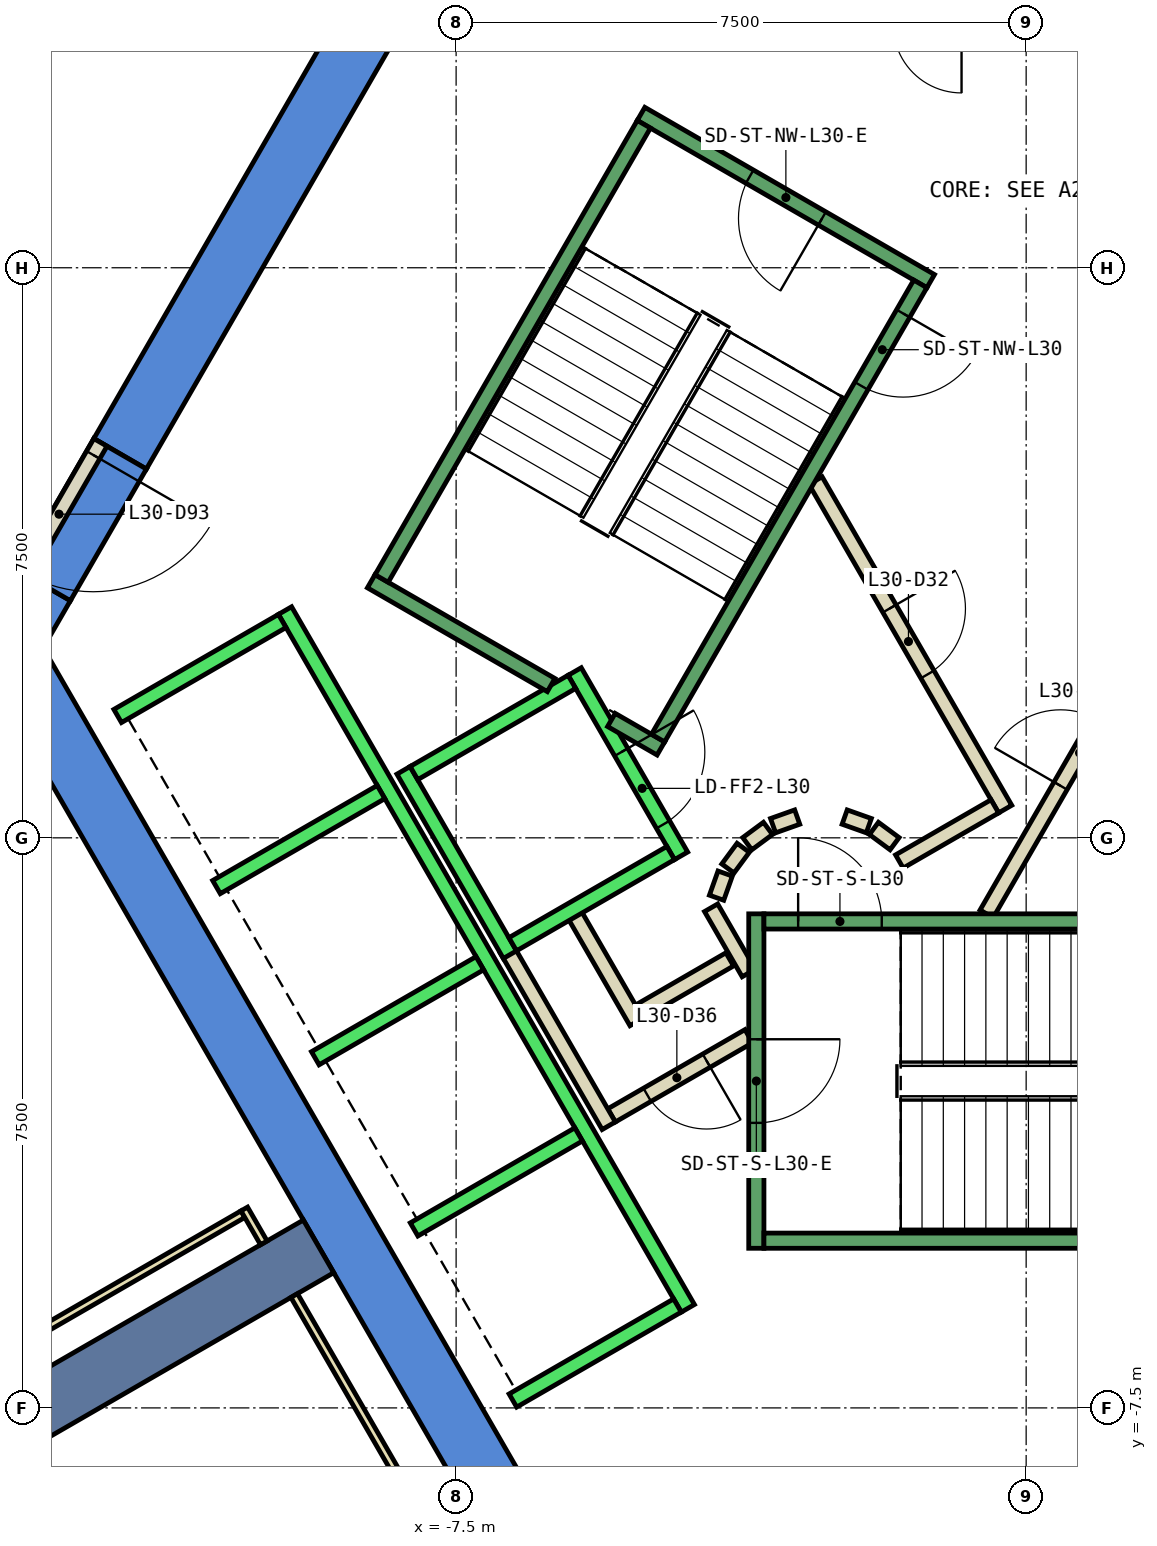
"""IFC4 building model, lengths in metres.
Left out: names, types, materials, properties, quantities, classifications, styles, units other than length and angle.
Written with IfcOpenShell. Run it as: python <this file> out.ifc"""

import sys

from ifc_helpers import new_model, si_unit, direction, frame, frame_2d, origin, place, context, subcontext, project, spatial, polyline, rectangle, outline, extrude, element, fill, save


model = new_model("IFC4")
c1 = context("Model", 3, precision=1e-05, world=origin(), true_north=direction((0.0, 1.0)))
c2 = subcontext(c1, "Body", "Model", "MODEL_VIEW")
j1 = project(units=[si_unit("LENGTHUNIT", "METRE"), si_unit("PLANEANGLEUNIT", "RADIAN")], contexts=[c1])
p1 = place(None, origin())
s1 = spatial("IfcSite", under=j1, at=p1, CompositionType="ELEMENT")
p2 = place(p1, origin())
s2 = spatial("IfcBuilding", under=s1, at=p2, CompositionType="ELEMENT")
p3 = place(p2, frame((0.0, 0.0, 138.2)))
s3 = spatial("IfcBuildingStorey", under=s2, at=p3, CompositionType="ELEMENT", Elevation=138.2)
p4 = place(p3, frame((0.0, 0.0, -0.6)))
e1 = element("IfcWall", 1, at=p4, inside=s3, PredefinedType="SHEAR", context=c2, shape_type="SweptSolid", body=[
    extrude(outline(polyline([(-12.267, 5.252), (-11.575, 4.852), (-6.466, 13.7), (-6.928, 14.5), (-12.267, 5.252)])), origin(), (0.0, 0.0, 1.0), 4.4),
])
p5 = place(p3, frame((0.0, 0.0, -0.6)))
e2 = element("IfcWall", 2, at=p5, inside=s3, PredefinedType="SHEAR", context=c2, shape_type="SweptSolid", body=[
    extrude(outline(polyline([(-12.575, 3.12), (-13.267, 3.52), (-13.856, 2.5), (-12.933, 2.5), (-12.575, 3.12)])), origin(), (0.0, 0.0, 1.0), 4.4),
])
p6 = place(p3, frame((0.0, 0.0, 3.6)))
e3 = element("IfcWall", 3, at=p6, inside=s3, PredefinedType="SHEAR", context=c2, shape_type="SweptSolid", body=[
    extrude(outline(polyline([(-13.267, 3.52), (-12.575, 3.12), (-11.575, 4.852), (-12.267, 5.252), (-13.267, 3.52)])), origin(), (0.0, 0.0, 1.0), 0.2),
])
p7 = place(p3, frame((0.0, 0.0, -0.6)))
e4 = element("IfcWall", 4, at=p7, inside=s3, PredefinedType="SHEAR", context=c2, shape_type="SweptSolid", body=[
    extrude(outline(polyline([(-13.856, 2.5), (-6.928, -9.5), (-6.466, -8.7), (-12.933, 2.5), (-13.856, 2.5)])), origin(), (0.0, 0.0, 1.0), 4.4),
])
p8 = place(p3, frame((-9.31, -5.375, -0.6), z_axis=(0.0, 0.0, 1.0), x_axis=(-0.866017533419, -0.500013631625, 0.0)))
e5 = element("IfcWall", 5, at=p8, inside=s3, PredefinedType="SHEAR", context=c2, shape_type="SweptSolid", body=[
    extrude(rectangle(XDim=9.0, YDim=0.8, at=frame_2d((4.5, 0.0))), origin(), (0.0, 0.0, 1.0), 4.4),
])
p9 = place(p3, frame((-3.9, -1.599, 0.0), z_axis=(0.0, 0.0, 1.0), x_axis=(-0.865969445389, -0.500096910261, 0.0)))
e6 = element("IfcWall", 6, at=p9, inside=s3, PredefinedType="PARTITIONING", context=c2, shape_type="SweptSolid", body=[
    extrude(rectangle(XDim=1.373, YDim=0.2, at=frame_2d((0.687, 0.0))), origin(), (0.0, 0.0, 1.0), 3.8),
])
p10 = place(p3, frame((-5.126, -2.422, 0.0), z_axis=(0.0, 0.0, 1.0), x_axis=(-0.500062241894, 0.865989465428, 0.0)))
e7 = element("IfcWall", 7, at=p10, inside=s3, PredefinedType="PARTITIONING", context=c2, shape_type="SweptSolid", body=[
    extrude(rectangle(XDim=1.7, YDim=0.2, at=frame_2d((0.85, 0.0))), origin(), (0.0, 0.0, 1.0), 3.8),
])
p11 = place(p3, frame((-3.65, -2.61, 0.0), z_axis=(0.0, 0.0, 1.0), x_axis=(-0.866072462134, -0.499918483688, 0.0)))
e8 = element("IfcWall", 8, at=p11, inside=s3, PredefinedType="PARTITIONING", context=c2, shape_type="SweptSolid", body=[
    extrude(rectangle(XDim=2.084, YDim=0.2, at=frame_2d((1.042, 0.0))), origin(), (0.0, 0.0, 1.0), 3.8),
])
p12 = place(p11, frame((0.642, 0.0, 0.0)))
e9 = element("IfcOpeningElement", 9, at=p12, cuts=e8, PredefinedType="OPENING", context=c2, shape_type="SweptSolid", body=[
    extrude(rectangle(XDim=0.9, YDim=2.1, at=frame_2d((0.45, 1.05))), frame((0.0, 0.11, 0.0), z_axis=(0.0, -1.0, 0.0), x_axis=(1.0, 0.0, 0.0)), (0.0, 0.0, 1.0), 0.22),
])
p13 = place(p3, frame((-5.492, -3.788, 0.0), z_axis=(0.0, 0.0, 1.0), x_axis=(-0.500008949224, 0.866020236886, 0.0)))
e10 = element("IfcWall", 10, at=p13, inside=s3, PredefinedType="PARTITIONING", context=c2, shape_type="SweptSolid", body=[
    extrude(rectangle(XDim=2.68, YDim=0.2, at=frame_2d((1.34, 0.0))), origin(), (0.0, 0.0, 1.0), 3.8),
])
p14 = place(p3, frame((-4.145, -0.92, 0.0), z_axis=(0.0, 0.0, 1.0), x_axis=(0.499743786207, -0.866173278362, 0.0)))
e11 = element("IfcWall", 11, at=p14, inside=s3, PredefinedType="PARTITIONING", context=c2, shape_type="SweptSolid", body=[
    extrude(rectangle(XDim=0.991, YDim=0.2, at=frame_2d((0.495, 0.0))), origin(), (0.0, 0.0, 1.0), 3.8),
])
p15 = place(p3, frame((-0.52, -1.0, 0.0), z_axis=(0.0, 0.0, 1.0), x_axis=(0.50011622646, 0.865958290007, 0.0)))
e12 = element("IfcWall", 12, at=p15, inside=s3, PredefinedType="PARTITIONING", context=c2, shape_type="SweptSolid", body=[
    extrude(rectangle(XDim=4.991, YDim=0.2, at=frame_2d((2.496, 0.0))), origin(), (0.0, 0.0, 1.0), 3.8),
])
p16 = place(p15, frame((1.945, 0.0, 0.0)))
e13 = element("IfcOpeningElement", 13, at=p16, cuts=e12, PredefinedType="OPENING", context=c2, shape_type="SweptSolid", body=[
    extrude(rectangle(XDim=1.0, YDim=2.1, at=frame_2d((0.5, 1.05))), frame((0.0, 0.11, 0.0), z_axis=(0.0, -1.0, 0.0), x_axis=(1.0, 0.0, 0.0)), (0.0, 0.0, 1.0), 0.22),
])
p17 = place(p3, frame((-2.771, 4.7, 0.0), z_axis=(0.0, 0.0, 1.0), x_axis=(0.499969479948, -0.866043023828, 0.0)))
e14 = element("IfcWall", 14, at=p17, inside=s3, PredefinedType="PARTITIONING", context=c2, shape_type="SweptSolid", body=[
    extrude(rectangle(XDim=4.99, YDim=0.2, at=frame_2d((2.495, 0.0))), origin(), (0.0, 0.0, 1.0), 3.8),
])
p18 = place(p17, frame((1.945, 0.0, 0.0)))
e15 = element("IfcOpeningElement", 15, at=p18, cuts=e14, PredefinedType="OPENING", context=c2, shape_type="SweptSolid", body=[
    extrude(rectangle(XDim=1.0, YDim=2.1, at=frame_2d((0.5, 1.05))), frame((0.0, 0.11, 0.0), z_axis=(0.0, -1.0, 0.0), x_axis=(1.0, 0.0, 0.0)), (0.0, 0.0, 1.0), 0.22),
])
p19 = place(p3, frame((-0.412, 0.414, 0.0), z_axis=(0.0, 0.0, 1.0), x_axis=(-0.866017369001, -0.500013916395, 0.0)))
e16 = element("IfcWall", 16, at=p19, inside=s3, PredefinedType="PARTITIONING", context=c2, shape_type="SweptSolid", body=[
    extrude(rectangle(XDim=1.45, YDim=0.2, at=frame_2d((0.725, 0.0))), origin(), (0.0, 0.0, 1.0), 3.8),
])
p20 = place(p3, frame((-1.731, -0.077, 0.0), z_axis=(0.0, 0.0, 1.0), x_axis=(-0.804311165252, 0.594208338422, 0.0)))
e17 = element("IfcWall", 17, at=p20, inside=s3, PredefinedType="PARTITIONING", context=c2, shape_type="SweptSolid", body=[
    extrude(rectangle(XDim=0.338, YDim=0.2, at=frame_2d((0.169, 0.0))), origin(), (0.0, 0.0, 1.0), 3.8),
])
p21 = place(p3, frame((-2.07, 0.16, 0.0), z_axis=(0.0, 0.0, 1.0), x_axis=(-0.942199461132, 0.335052496547, 0.0)))
e18 = element("IfcWall", 18, at=p21, inside=s3, PredefinedType="PARTITIONING", context=c2, shape_type="SweptSolid", body=[
    extrude(rectangle(XDim=0.337, YDim=0.2, at=frame_2d((0.169, 0.0))), origin(), (0.0, 0.0, 1.0), 3.8),
])
p22 = place(p3, frame((-3.012, 0.273, 0.0), z_axis=(0.0, 0.0, 1.0), x_axis=(-0.942280615813, -0.334824194261, 0.0)))
e19 = element("IfcWall", 19, at=p22, inside=s3, PredefinedType="PARTITIONING", context=c2, shape_type="SweptSolid", body=[
    extrude(rectangle(XDim=0.338, YDim=0.2, at=frame_2d((0.169, 0.0))), origin(), (0.0, 0.0, 1.0), 3.8),
])
p23 = place(p3, frame((-3.397, 0.124, 0.0), z_axis=(0.0, 0.0, 1.0), x_axis=(-0.804311165252, -0.594208338422, 0.0)))
e20 = element("IfcWall", 20, at=p23, inside=s3, PredefinedType="PARTITIONING", context=c2, shape_type="SweptSolid", body=[
    extrude(rectangle(XDim=0.338, YDim=0.2, at=frame_2d((0.169, 0.0))), origin(), (0.0, 0.0, 1.0), 3.8),
])
p24 = place(p3, frame((-3.723, -0.131, 0.0), z_axis=(0.0, 0.0, 1.0), x_axis=(-0.594675113454, -0.803966112121, 0.0)))
e21 = element("IfcWall", 21, at=p24, inside=s3, PredefinedType="PARTITIONING", context=c2, shape_type="SweptSolid", body=[
    extrude(rectangle(XDim=0.338, YDim=0.2, at=frame_2d((0.169, 0.0))), origin(), (0.0, 0.0, 1.0), 3.8),
])
p25 = place(p3, frame((-3.96, -0.47, 0.0), z_axis=(0.0, 0.0, 1.0), x_axis=(-0.334824194261, -0.942280615813, 0.0)))
e22 = element("IfcWall", 22, at=p25, inside=s3, PredefinedType="PARTITIONING", context=c2, shape_type="SweptSolid", body=[
    extrude(rectangle(XDim=0.338, YDim=0.2, at=frame_2d((0.169, 0.0))), origin(), (0.0, 0.0, 1.0), 3.8),
])
p26 = place(p3, frame((-7.572, -9.586, 0.0), z_axis=(0.0, 0.0, 1.0), x_axis=(-0.500037407586, 0.866003805427, 0.0)))
e23 = element("IfcWall", 23, at=p26, inside=s3, PredefinedType="PARTITIONING", context=c2, shape_type="SweptSolid", body=[
    extrude(rectangle(XDim=4.115, YDim=0.1, at=frame_2d((2.058, 0.0))), origin(), (0.0, 0.0, 1.0), 3.8),
])
p27 = place(p3, frame((-10.305, -4.951, 0.0), z_axis=(0.0, 0.0, 1.0), x_axis=(-0.866031185235, -0.4999899861, 0.0)))
e24 = element("IfcWall", 24, at=p27, inside=s3, PredefinedType="PARTITIONING", context=c2, shape_type="SweptSolid", body=[
    extrude(rectangle(XDim=4.95, YDim=0.1, at=frame_2d((2.475, 0.0))), origin(), (0.0, 0.0, 1.0), 3.8),
])
p28 = place(p3, frame((-12.18, 5.202, 0.0), z_axis=(0.0, 0.0, 1.0), x_axis=(-0.50002537861, -0.866010750942, 0.0)))
e25 = element("IfcWall", 25, at=p28, inside=s3, PredefinedType="PARTITIONING", context=c2, shape_type="SweptSolid", body=[
    extrude(rectangle(XDim=2.0, YDim=0.2, at=frame_2d((1.0, 0.0))), origin(), (0.0, 0.0, 1.0), 2.4),
])
p29 = place(p28, frame((0.19, 0.0, 0.0)))
e26 = element("IfcOpeningElement", 26, at=p29, cuts=e25, PredefinedType="OPENING", context=c2, shape_type="SweptSolid", body=[
    extrude(rectangle(XDim=1.8, YDim=2.1, at=frame_2d((0.9, 1.05))), frame((0.0, 0.11, 0.0), z_axis=(0.0, -1.0, 0.0), x_axis=(1.0, 0.0, 0.0)), (0.0, 0.0, 1.0), 0.22),
])
p30 = place(p3, frame((-10.03, -5.329, 0.0), z_axis=(0.0, 0.0, 1.0), x_axis=(-0.499352927503, 0.866398669086, 0.0)))
e27 = element("IfcWall", 27, at=p30, inside=s3, PredefinedType="PARTITIONING", context=c2, shape_type="SweptSolid", body=[
    extrude(rectangle(XDim=0.515, YDim=0.1, at=frame_2d((0.257, 0.0))), origin(), (0.0, 0.0, 1.0), 3.8),
])
p31 = place(p3, frame((-5.94, 2.188, 0.0), z_axis=(0.0, 0.0, 1.0), x_axis=(0.49994636267, -0.866056369097, 0.0)))
e28 = element("IfcWall", 28, at=p31, inside=s3, PredefinedType="STANDARD", context=c2, shape_type="SweptSolid", body=[
    extrude(rectangle(XDim=2.8, YDim=0.2, at=frame_2d((1.4, 0.0))), origin(), (0.0, 0.0, 1.0), 3.8),
])
p32 = place(p31, frame((1.225, 0.0, 0.0)))
e29 = element("IfcOpeningElement", 29, at=p32, cuts=e28, PredefinedType="OPENING", context=c2, shape_type="SweptSolid", body=[
    extrude(rectangle(XDim=1.1, YDim=2.1, at=frame_2d((0.55, 1.05))), frame((0.0, 0.11, 0.0), z_axis=(0.0, -1.0, 0.0), x_axis=(1.0, 0.0, 0.0)), (0.0, 0.0, 1.0), 0.22),
])
p33 = place(p3, frame((-8.192, 0.888, 0.0), z_axis=(0.0, 0.0, 1.0), x_axis=(0.49994636267, -0.866056369097, 0.0)))
e30 = element("IfcWall", 30, at=p33, inside=s3, PredefinedType="STANDARD", context=c2, shape_type="SweptSolid", body=[
    extrude(rectangle(XDim=2.8, YDim=0.2, at=frame_2d((1.4, 0.0))), origin(), (0.0, 0.0, 1.0), 3.8),
])
for number, where, z_axis, x_axis in (
    (31, (-5.977, 2.052, 0.0), (0.0, 0.0, 1.0), (-0.866, -0.5, 0.0)),
    (32, (-4.677, -0.2, 0.0), (0.0, 0.0, 1.0), (-0.866, -0.5, 0.0)),
):
    element("IfcWall", number, at=place(p3, frame(where, z_axis=z_axis, x_axis=x_axis)), inside=s3, PredefinedType="STANDARD", context=c2, shape_type="SweptSolid", body=[
        extrude(rectangle(XDim=2.399, YDim=0.2, at=frame_2d((1.2, 0.0))), origin(), (0.0, 0.0, 1.0), 3.8),
    ])
p34 = place(p3, frame((-9.751, 2.99, 0.0), z_axis=(0.0, 0.0, 1.0), x_axis=(0.50000090737, -0.866024879913, 0.0)))
e33 = element("IfcWall", 33, at=p34, inside=s3, PredefinedType="STANDARD", context=c2, shape_type="SweptSolid", body=[
    extrude(rectangle(XDim=10.6, YDim=0.2, at=frame_2d((5.3, 0.0))), origin(), (0.0, 0.0, 1.0), 3.8),
])
p35 = place(p3, frame((-9.788, 2.853, 0.0), z_axis=(0.0, 0.0, 1.0), x_axis=(-0.865998541277, -0.500046524342, 0.0)))
e34 = element("IfcWall", 34, at=p35, inside=s3, PredefinedType="STANDARD", context=c2, shape_type="SweptSolid", body=[
    extrude(rectangle(XDim=2.5, YDim=0.2, at=frame_2d((1.25, 0.0))), origin(), (0.0, 0.0, 1.0), 3.8),
])
for number, where, z_axis, x_axis in (
    (35, (-8.488, 0.602, 0.0), (0.0, 0.0, 1.0), (-0.866, -0.5, 0.0)),
    (36, (-7.188, -1.65, 0.0), (0.0, 0.0, 1.0), (-0.866, -0.5, 0.0)),
    (37, (-5.888, -3.902, 0.0), (0.0, 0.0, 1.0), (-0.866, -0.5, 0.0)),
    (38, (-4.588, -6.153, 0.0), (0.0, 0.0, 1.0), (-0.866, -0.5, 0.0)),
):
    element("IfcWall", number, at=place(p3, frame(where, z_axis=z_axis, x_axis=x_axis)), inside=s3, PredefinedType="STANDARD", context=c2, shape_type="SweptSolid", body=[
        extrude(rectangle(XDim=2.5, YDim=0.2, at=frame_2d((1.25, 0.0))), origin(), (0.0, 0.0, 1.0), 3.8),
    ])
p36 = place(p3, frame((-3.55, -1.0, 0.0), z_axis=(0.0, 0.0, 1.0), x_axis=(0.0, -1.0, 0.0)))
e39 = element("IfcWall", 39, at=p36, inside=s3, PredefinedType="STANDARD", context=c2, shape_type="SweptSolid", body=[
    extrude(rectangle(XDim=4.4, YDim=0.2, at=frame_2d((2.2, 0.0))), origin(), (0.0, 0.0, 1.0), 3.8),
])
p37 = place(p36, frame((1.65, 0.0, 0.0)))
e40 = element("IfcOpeningElement", 40, at=p37, cuts=e39, PredefinedType="OPENING", context=c2, shape_type="SweptSolid", body=[
    extrude(rectangle(XDim=1.1, YDim=2.2, at=frame_2d((0.55, 1.1))), frame((0.0, 0.11, 0.0), z_axis=(0.0, -1.0, 0.0), x_axis=(1.0, 0.0, 0.0)), (0.0, 0.0, 1.0), 0.22),
])
p38 = place(p3, frame((-3.45, -1.1, 0.0), z_axis=(0.0, 0.0, 1.0), x_axis=(1.0, 0.0, 0.0)))
e41 = element("IfcWall", 41, at=p38, inside=s3, PredefinedType="STANDARD", context=c2, shape_type="SweptSolid", body=[
    extrude(rectangle(XDim=6.9, YDim=0.2, at=frame_2d((3.45, 0.0))), origin(), (0.0, 0.0, 1.0), 3.8),
])
p39 = place(p38, frame((0.45, 0.0, 0.0)))
e42 = element("IfcOpeningElement", 42, at=p39, cuts=e41, PredefinedType="OPENING", context=c2, shape_type="SweptSolid", body=[
    extrude(rectangle(XDim=1.1, YDim=2.2, at=frame_2d((0.55, 1.1))), frame((0.0, 0.11, 0.0), z_axis=(0.0, -1.0, 0.0), x_axis=(1.0, 0.0, 0.0)), (0.0, 0.0, 1.0), 0.22),
])
p40 = place(p3, frame((-3.45, -5.3, 0.0), z_axis=(0.0, 0.0, 1.0), x_axis=(1.0, 0.0, 0.0)))
e43 = element("IfcWall", 43, at=p40, inside=s3, PredefinedType="STANDARD", context=c2, shape_type="SweptSolid", body=[
    extrude(rectangle(XDim=6.9, YDim=0.2, at=frame_2d((3.45, 0.0))), origin(), (0.0, 0.0, 1.0), 3.8),
])
p41 = place(p3, frame((-1.256, 7.324, 0.0), z_axis=(0.0, 0.0, 1.0), x_axis=(-0.866046073146, 0.499964197906, 0.0)))
e44 = element("IfcWall", 44, at=p41, inside=s3, PredefinedType="STANDARD", context=c2, shape_type="SweptSolid", body=[
    extrude(rectangle(XDim=4.4, YDim=0.2, at=frame_2d((2.2, 0.0))), origin(), (0.0, 0.0, 1.0), 3.8),
])
p42 = place(p41, frame((1.65, 0.0, 0.0)))
e45 = element("IfcOpeningElement", 45, at=p42, cuts=e44, PredefinedType="OPENING", context=c2, shape_type="SweptSolid", body=[
    extrude(rectangle(XDim=1.1, YDim=2.2, at=frame_2d((0.55, 1.1))), frame((0.0, 0.11, 0.0), z_axis=(0.0, -1.0, 0.0), x_axis=(1.0, 0.0, 0.0)), (0.0, 0.0, 1.0), 0.22),
])
p43 = place(p3, frame((-6.25, 2.01, 0.0), z_axis=(0.0, 0.0, 1.0), x_axis=(-0.86611865017, 0.499838457731, 0.0)))
e46 = element("IfcWall", 46, at=p43, inside=s3, PredefinedType="STANDARD", context=c2, shape_type="SweptSolid", body=[
    extrude(rectangle(XDim=2.733, YDim=0.2, at=frame_2d((1.366, 0.0))), origin(), (0.0, 0.0, 1.0), 3.8),
])
p44 = place(p3, frame((-4.806, 1.176, 0.0), z_axis=(0.0, 0.0, 1.0), x_axis=(-0.866558586415, 0.499075361355, 0.0)))
e47 = element("IfcWall", 47, at=p44, inside=s3, PredefinedType="STANDARD", context=c2, shape_type="SweptSolid", body=[
    extrude(rectangle(XDim=0.751, YDim=0.2, at=frame_2d((0.376, 0.0))), origin(), (0.0, 0.0, 1.0), 3.8),
])
p45 = place(p3, frame((-1.393, 7.288, 0.0), z_axis=(0.0, 0.0, 1.0), x_axis=(-0.499963383562, -0.866046543262, 0.0)))
e48 = element("IfcWall", 48, at=p45, inside=s3, PredefinedType="STANDARD", context=c2, shape_type="SweptSolid", body=[
    extrude(rectangle(XDim=6.9, YDim=0.2, at=frame_2d((3.45, 0.0))), origin(), (0.0, 0.0, 1.0), 3.8),
])
p46 = place(p45, frame((0.45, 0.0, 0.0)))
e49 = element("IfcOpeningElement", 49, at=p46, cuts=e48, PredefinedType="OPENING", context=c2, shape_type="SweptSolid", body=[
    extrude(rectangle(XDim=1.1, YDim=2.2, at=frame_2d((0.55, 1.1))), frame((0.0, 0.11, 0.0), z_axis=(0.0, -1.0, 0.0), x_axis=(1.0, 0.0, 0.0)), (0.0, 0.0, 1.0), 0.22),
])
p47 = place(p3, frame((-5.03, 9.388, 0.0), z_axis=(0.0, 0.0, 1.0), x_axis=(-0.499978703459, -0.866037698999, 0.0)))
e50 = element("IfcWall", 50, at=p47, inside=s3, PredefinedType="STANDARD", context=c2, shape_type="SweptSolid", body=[
    extrude(rectangle(XDim=6.9, YDim=0.2, at=frame_2d((3.45, 0.0))), origin(), (0.0, 0.0, 1.0), 3.8),
])
p48 = place(p16, origin())
e51 = element("IfcDoor", 51, at=p48, inside=s3, OperationType="SINGLE_SWING_LEFT", PredefinedType="DOOR", context=c2, shape_type="SweptSolid", body=[
    extrude(rectangle(XDim=1.0, YDim=2.1, at=frame_2d((0.5, 1.05))), frame((0.0, 0.025, 0.0), z_axis=(0.0, -1.0, 0.0), x_axis=(1.0, 0.0, 0.0)), (0.0, 0.0, 1.0), 0.05),
])
fill(e13, e51)
p49 = place(p18, origin())
e52 = element("IfcDoor", 52, at=p49, inside=s3, OperationType="SINGLE_SWING_RIGHT", PredefinedType="DOOR", context=c2, shape_type="SweptSolid", body=[
    extrude(rectangle(XDim=1.0, YDim=2.1, at=frame_2d((0.5, 1.05))), frame((0.0, 0.025, 0.0), z_axis=(0.0, -1.0, 0.0), x_axis=(1.0, 0.0, 0.0)), (0.0, 0.0, 1.0), 0.05),
])
fill(e15, e52)
p50 = place(p12, origin())
e53 = element("IfcDoor", 53, at=p50, inside=s3, OperationType="SINGLE_SWING_LEFT", PredefinedType="DOOR", context=c2, shape_type="SweptSolid", body=[
    extrude(rectangle(XDim=0.9, YDim=2.1, at=frame_2d((0.45, 1.05))), frame((0.0, 0.025, 0.0), z_axis=(0.0, -1.0, 0.0), x_axis=(1.0, 0.0, 0.0)), (0.0, 0.0, 1.0), 0.05),
])
fill(e9, e53)
p51 = place(p29, origin())
e54 = element("IfcDoor", 54, at=p51, inside=s3, OperationType="DOUBLE_DOOR_SINGLE_SWING", PredefinedType="DOOR", context=c2, shape_type="SweptSolid", body=[
    extrude(rectangle(XDim=1.8, YDim=2.1, at=frame_2d((0.9, 1.05))), frame((0.0, 0.025, 0.0), z_axis=(0.0, -1.0, 0.0), x_axis=(1.0, 0.0, 0.0)), (0.0, 0.0, 1.0), 0.05),
])
fill(e26, e54)
p52 = place(p32, origin())
e55 = element("IfcDoor", 55, at=p52, inside=s3, OperationType="SLIDING_TO_LEFT", PredefinedType="DOOR", context=c2, shape_type="SweptSolid", body=[
    extrude(rectangle(XDim=1.1, YDim=2.1, at=frame_2d((0.55, 1.05))), frame((0.0, 0.025, 0.0), z_axis=(0.0, -1.0, 0.0), x_axis=(1.0, 0.0, 0.0)), (0.0, 0.0, 1.0), 0.05),
])
fill(e29, e55)
p53 = place(p39, origin())
e56 = element("IfcDoor", 56, at=p53, inside=s3, OperationType="SINGLE_SWING_LEFT", PredefinedType="DOOR", context=c2, shape_type="SweptSolid", body=[
    extrude(rectangle(XDim=1.1, YDim=2.2, at=frame_2d((0.55, 1.1))), frame((0.0, 0.025, 0.0), z_axis=(0.0, -1.0, 0.0), x_axis=(1.0, 0.0, 0.0)), (0.0, 0.0, 1.0), 0.05),
])
fill(e42, e56)
p54 = place(p37, origin())
e57 = element("IfcDoor", 57, at=p54, inside=s3, OperationType="SINGLE_SWING_LEFT", PredefinedType="DOOR", context=c2, shape_type="SweptSolid", body=[
    extrude(rectangle(XDim=1.1, YDim=2.2, at=frame_2d((0.55, 1.1))), frame((0.0, 0.025, 0.0), z_axis=(0.0, -1.0, 0.0), x_axis=(1.0, 0.0, 0.0)), (0.0, 0.0, 1.0), 0.05),
])
fill(e40, e57)
p55 = place(p46, origin())
e58 = element("IfcDoor", 58, at=p55, inside=s3, OperationType="SINGLE_SWING_LEFT", PredefinedType="DOOR", context=c2, shape_type="SweptSolid", body=[
    extrude(rectangle(XDim=1.1, YDim=2.2, at=frame_2d((0.55, 1.1))), frame((0.0, 0.025, 0.0), z_axis=(0.0, -1.0, 0.0), x_axis=(1.0, 0.0, 0.0)), (0.0, 0.0, 1.0), 0.05),
])
fill(e49, e58)
p56 = place(p42, origin())
e59 = element("IfcDoor", 59, at=p56, inside=s3, OperationType="SINGLE_SWING_LEFT", PredefinedType="DOOR", context=c2, shape_type="SweptSolid", body=[
    extrude(rectangle(XDim=1.1, YDim=2.2, at=frame_2d((0.55, 1.1))), frame((0.0, 0.025, 0.0), z_axis=(0.0, -1.0, 0.0), x_axis=(1.0, 0.0, 0.0)), (0.0, 0.0, 1.0), 0.05),
])
fill(e45, e59)
save(model, sys.argv[1])
